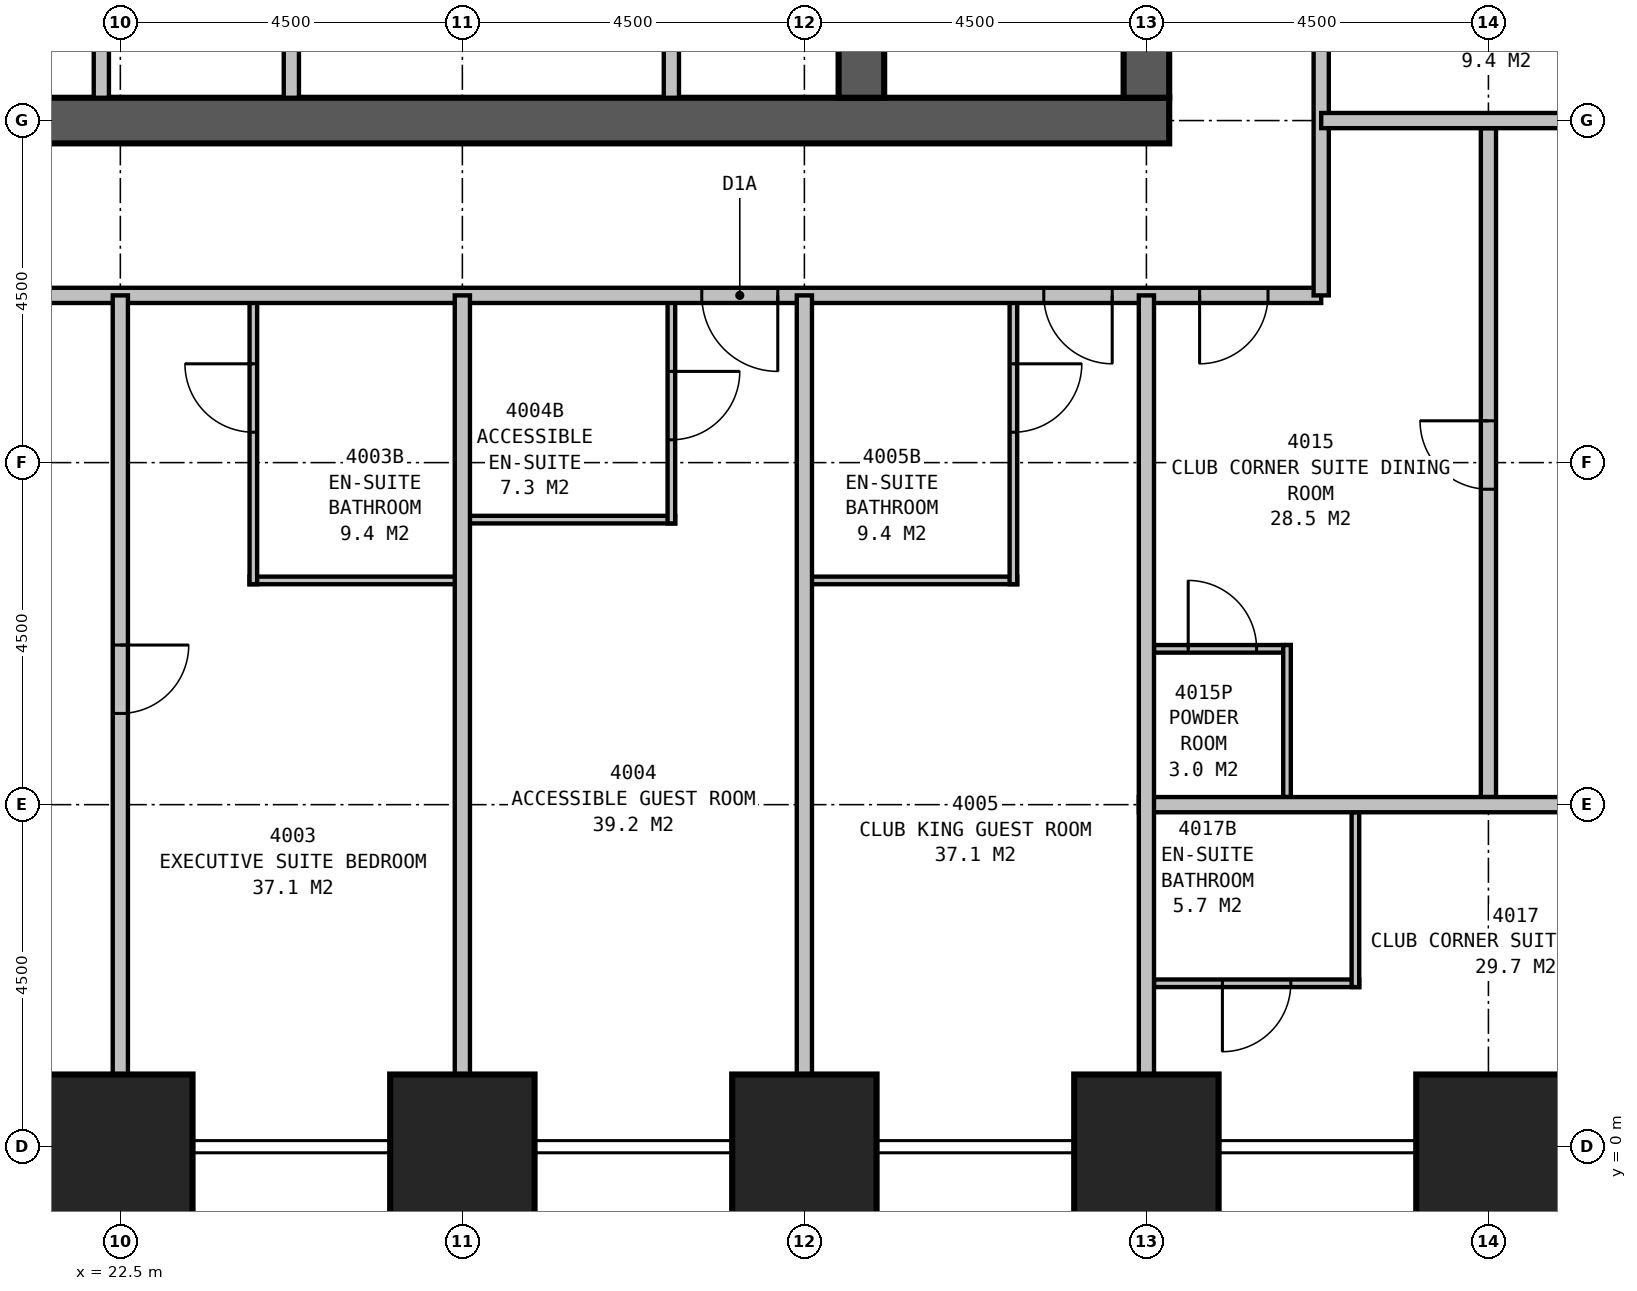
"""IFC4 building model, lengths in metres.
Left out: names, types, materials, properties, quantities, classifications, styles, units other than length and angle.
Written with IfcOpenShell. Run it as: python <this file> out.ifc"""

import sys

from ifc_helpers import new_model, si_unit, direction, frame, frame_2d, origin, origin_2d, place, context, subcontext, project, spatial, rectangle, extrude, element, fill, save


model = new_model("IFC4")
c1 = context("Model", 3, precision=1e-05, world=origin(), true_north=direction((0.0, 1.0)))
c2 = subcontext(c1, "Body", "Model", "MODEL_VIEW")
j1 = project(units=[si_unit("LENGTHUNIT", "METRE"), si_unit("PLANEANGLEUNIT", "RADIAN")], contexts=[c1])
p1 = place(None, origin())
s1 = spatial("IfcSite", under=j1, at=p1, CompositionType="ELEMENT")
p2 = place(p1, origin())
s2 = spatial("IfcBuilding", under=s1, at=p2, CompositionType="ELEMENT")
p3 = place(p2, frame((0.0, 0.0, 157.9)))
s3 = spatial("IfcBuildingStorey", under=s2, at=p3, CompositionType="ELEMENT", Elevation=157.9)
for number, where, z_axis, x_axis in (
    (1, (22.5, 0.0, 0.0), (0.0, 0.0, 1.0), (1.0, 0.0, 0.0)),
    (2, (27.0, 0.0, 0.0), (0.0, 0.0, 1.0), (1.0, 0.0, 0.0)),
    (3, (31.5, 0.0, 0.0), (0.0, 0.0, 1.0), (1.0, 0.0, 0.0)),
    (4, (36.0, 0.0, 0.0), (0.0, 0.0, 1.0), (1.0, 0.0, 0.0)),
    (5, (40.5, 0.0, 0.0), (0.0, 0.0, 1.0), (1.0, 0.0, 0.0)),
):
    element("IfcColumn", number, at=place(p3, frame(where, z_axis=z_axis, x_axis=x_axis)), inside=s3, PredefinedType="COLUMN", context=c2, shape_type="SweptSolid", body=[
        extrude(rectangle(XDim=1.9, YDim=1.9, at=origin_2d()), origin(), (0.0, 0.0, 1.0), 4.5),
    ])
p4 = place(p3, frame((13.2, 13.5, 0.0), z_axis=(0.0, 0.0, 1.0), x_axis=(1.0, 0.0, 0.0)))
e6 = element("IfcWall", 6, at=p4, inside=s3, PredefinedType="SHEAR", context=c2, shape_type="SweptSolid", body=[
    extrude(rectangle(XDim=23.1, YDim=0.6, at=frame_2d((11.55, 0.0))), origin(), (0.0, 0.0, 1.0), 4.5),
])
p5 = place(p3, frame((32.25, 13.8, 0.0), z_axis=(0.0, 0.0, 1.0), x_axis=(0.0, 1.0, 0.0)))
e7 = element("IfcWall", 7, at=p5, inside=s3, PredefinedType="SHEAR", context=c2, shape_type="SweptSolid", body=[
    extrude(rectangle(XDim=12.9, YDim=0.6, at=frame_2d((6.45, 0.0))), origin(), (0.0, 0.0, 1.0), 4.5),
])
p6 = place(p5, frame((5.05, 0.0, 0.0), z_axis=(0.0, 0.0, 1.0), x_axis=(-1.0, 0.0, 0.0)))
e8 = element("IfcOpeningElement", 8, at=p6, cuts=e7, PredefinedType="OPENING", context=c2, shape_type="SweptSolid", body=[
    extrude(rectangle(XDim=1.2, YDim=2.1, at=frame_2d((0.6, 1.05))), frame((0.0, 0.31, 0.0), z_axis=(0.0, -1.0, 0.0), x_axis=(1.0, 0.0, 0.0)), (0.0, 0.0, 1.0), 0.62),
])
p7 = place(p3, frame((36.0, 13.8, 0.0), z_axis=(0.0, 0.0, 1.0), x_axis=(0.0, 1.0, 0.0)))
e9 = element("IfcWall", 9, at=p7, inside=s3, PredefinedType="SHEAR", context=c2, shape_type="SweptSolid", body=[
    extrude(rectangle(XDim=2.7, YDim=0.6, at=frame_2d((1.35, 0.0))), origin(), (0.0, 0.0, 1.0), 4.5),
])
p8 = place(p3, frame((11.2, 11.2, 0.0), z_axis=(0.0, 0.0, 1.0), x_axis=(1.0, 0.0, 0.0)))
e10 = element("IfcWall", 10, at=p8, inside=s3, PredefinedType="PARTITIONING", context=c2, shape_type="SweptSolid", body=[
    extrude(rectangle(XDim=27.1, YDim=0.2, at=frame_2d((13.55, 0.0))), origin(), (0.0, 0.0, 1.0), 4.25),
])
p9 = place(p8, frame((5.95, 0.0, 0.0), z_axis=(0.0, 0.0, 1.0), x_axis=(-1.0, 0.0, 0.0)))
e11 = element("IfcOpeningElement", 11, at=p9, cuts=e10, PredefinedType="OPENING", context=c2, shape_type="SweptSolid", body=[
    extrude(rectangle(XDim=0.9, YDim=2.1, at=frame_2d((0.45, 1.05))), frame((0.0, 0.11, 0.0), z_axis=(0.0, -1.0, 0.0), x_axis=(1.0, 0.0, 0.0)), (0.0, 0.0, 1.0), 0.22),
])
p10 = place(p8, frame((19.95, 0.0, 0.0), z_axis=(0.0, 0.0, 1.0), x_axis=(-1.0, 0.0, 0.0)))
e12 = element("IfcOpeningElement", 12, at=p10, cuts=e10, PredefinedType="OPENING", context=c2, shape_type="SweptSolid", body=[
    extrude(rectangle(XDim=1.0, YDim=2.1, at=frame_2d((0.5, 1.05))), frame((0.0, 0.11, 0.0), z_axis=(0.0, -1.0, 0.0), x_axis=(1.0, 0.0, 0.0)), (0.0, 0.0, 1.0), 0.22),
])
p11 = place(p8, frame((24.35, 0.0, 0.0), z_axis=(0.0, 0.0, 1.0), x_axis=(-1.0, 0.0, 0.0)))
e13 = element("IfcOpeningElement", 13, at=p11, cuts=e10, PredefinedType="OPENING", context=c2, shape_type="SweptSolid", body=[
    extrude(rectangle(XDim=0.9, YDim=2.1, at=frame_2d((0.45, 1.05))), frame((0.0, 0.11, 0.0), z_axis=(0.0, -1.0, 0.0), x_axis=(1.0, 0.0, 0.0)), (0.0, 0.0, 1.0), 0.22),
])
p12 = place(p8, frame((1.6, 0.0, 0.0), z_axis=(0.0, 0.0, 1.0), x_axis=(-1.0, 0.0, 0.0)))
e14 = element("IfcOpeningElement", 14, at=p12, cuts=e10, PredefinedType="OPENING", context=c2, shape_type="SweptSolid", body=[
    extrude(rectangle(XDim=0.9, YDim=2.1, at=frame_2d((0.45, 1.05))), frame((0.0, 0.11, 0.0), z_axis=(0.0, -1.0, 0.0), x_axis=(1.0, 0.0, 0.0)), (0.0, 0.0, 1.0), 0.22),
])
p13 = place(p8, frame((26.4, 0.0, 0.0), z_axis=(0.0, 0.0, 1.0), x_axis=(-1.0, 0.0, 0.0)))
e15 = element("IfcOpeningElement", 15, at=p13, cuts=e10, PredefinedType="OPENING", context=c2, shape_type="SweptSolid", body=[
    extrude(rectangle(XDim=0.9, YDim=2.1, at=frame_2d((0.45, 1.05))), frame((0.0, 0.11, 0.0), z_axis=(0.0, -1.0, 0.0), x_axis=(1.0, 0.0, 0.0)), (0.0, 0.0, 1.0), 0.22),
])
p14 = place(p3, frame((38.3, 11.2, 0.0), z_axis=(0.0, 0.0, 1.0), x_axis=(0.0, 1.0, 0.0)))
e16 = element("IfcWall", 16, at=p14, inside=s3, PredefinedType="PARTITIONING", context=c2, shape_type="SweptSolid", body=[
    extrude(rectangle(XDim=18.7, YDim=0.2, at=frame_2d((9.35, 0.0))), origin(), (0.0, 0.0, 1.0), 4.25),
])
p15 = place(p14, frame((6.35, 0.0, 0.0), z_axis=(0.0, 0.0, 1.0), x_axis=(-1.0, 0.0, 0.0)))
e17 = element("IfcOpeningElement", 17, at=p15, cuts=e16, PredefinedType="OPENING", context=c2, shape_type="SweptSolid", body=[
    extrude(rectangle(XDim=0.9, YDim=2.1, at=frame_2d((0.45, 1.05))), frame((0.0, 0.11, 0.0), z_axis=(0.0, -1.0, 0.0), x_axis=(1.0, 0.0, 0.0)), (0.0, 0.0, 1.0), 0.22),
])
p16 = place(p14, frame((10.45, 0.0, 0.0), z_axis=(0.0, 0.0, 1.0), x_axis=(-1.0, 0.0, 0.0)))
e18 = element("IfcOpeningElement", 18, at=p16, cuts=e16, PredefinedType="OPENING", context=c2, shape_type="SweptSolid", body=[
    extrude(rectangle(XDim=0.9, YDim=2.1, at=frame_2d((0.45, 1.05))), frame((0.0, 0.11, 0.0), z_axis=(0.0, -1.0, 0.0), x_axis=(1.0, 0.0, 0.0)), (0.0, 0.0, 1.0), 0.22),
])
p17 = place(p3, frame((22.5, 11.2, 0.0), z_axis=(0.0, 0.0, 1.0), x_axis=(0.0, -1.0, 0.0)))
e19 = element("IfcWall", 19, at=p17, inside=s3, PredefinedType="PARTITIONING", context=c2, shape_type="SweptSolid", body=[
    extrude(rectangle(XDim=11.2, YDim=0.2, at=frame_2d((5.6, 0.0))), origin(), (0.0, 0.0, 1.0), 3.25),
])
p18 = place(p17, frame((4.6, 0.0, 0.0)))
e20 = element("IfcOpeningElement", 20, at=p18, cuts=e19, PredefinedType="OPENING", context=c2, shape_type="SweptSolid", body=[
    extrude(rectangle(XDim=0.9, YDim=2.1, at=frame_2d((0.45, 1.05))), frame((0.0, 0.11, 0.0), z_axis=(0.0, -1.0, 0.0), x_axis=(1.0, 0.0, 0.0)), (0.0, 0.0, 1.0), 0.22),
])
for number, where, z_axis, x_axis in (
    (21, (27.0, 11.2, 0.0), (0.0, 0.0, 1.0), (0.0, -1.0, 0.0)),
    (22, (31.5, 11.2, 0.0), (0.0, 0.0, 1.0), (0.0, -1.0, 0.0)),
):
    element("IfcWall", number, at=place(p3, frame(where, z_axis=z_axis, x_axis=x_axis)), inside=s3, PredefinedType="PARTITIONING", context=c2, shape_type="SweptSolid", body=[
        extrude(rectangle(XDim=11.2, YDim=0.2, at=frame_2d((5.6, 0.0))), origin(), (0.0, 0.0, 1.0), 3.25),
    ])
p19 = place(p3, frame((24.2, 7.45, 0.0), z_axis=(0.0, 0.0, 1.0), x_axis=(1.0, 0.0, 0.0)))
e23 = element("IfcWall", 23, at=p19, inside=s3, PredefinedType="PLUMBINGWALL", context=c2, shape_type="SweptSolid", body=[
    extrude(rectangle(XDim=2.8, YDim=0.1, at=frame_2d((1.4, 0.0))), origin(), (0.0, 0.0, 1.0), 4.25),
])
p20 = place(p3, frame((24.25, 11.2, 0.0), z_axis=(0.0, 0.0, 1.0), x_axis=(0.0, -1.0, 0.0)))
e24 = element("IfcWall", 24, at=p20, inside=s3, PredefinedType="PLUMBINGWALL", context=c2, shape_type="SweptSolid", body=[
    extrude(rectangle(XDim=3.8, YDim=0.1, at=frame_2d((1.9, 0.0))), origin(), (0.0, 0.0, 1.0), 4.25),
])
p21 = place(p20, frame((1.8, 0.0, 0.0), z_axis=(0.0, 0.0, 1.0), x_axis=(-1.0, 0.0, 0.0)))
e25 = element("IfcOpeningElement", 25, at=p21, cuts=e24, PredefinedType="OPENING", context=c2, shape_type="SweptSolid", body=[
    extrude(rectangle(XDim=0.9, YDim=2.1, at=frame_2d((0.45, 1.05))), frame((0.0, 0.06, 0.0), z_axis=(0.0, -1.0, 0.0), x_axis=(1.0, 0.0, 0.0)), (0.0, 0.0, 1.0), 0.12),
])
p22 = place(p3, frame((27.0, 8.25, 0.0), z_axis=(0.0, 0.0, 1.0), x_axis=(1.0, 0.0, 0.0)))
e26 = element("IfcWall", 26, at=p22, inside=s3, PredefinedType="PLUMBINGWALL", context=c2, shape_type="SweptSolid", body=[
    extrude(rectangle(XDim=2.8, YDim=0.1, at=frame_2d((1.4, 0.0))), origin(), (0.0, 0.0, 1.0), 4.25),
])
p23 = place(p3, frame((29.75, 11.2, 0.0), z_axis=(0.0, 0.0, 1.0), x_axis=(0.0, -1.0, 0.0)))
e27 = element("IfcWall", 27, at=p23, inside=s3, PredefinedType="PLUMBINGWALL", context=c2, shape_type="SweptSolid", body=[
    extrude(rectangle(XDim=3.0, YDim=0.1, at=frame_2d((1.5, 0.0))), origin(), (0.0, 0.0, 1.0), 4.25),
])
p24 = place(p23, frame((1.0, 0.0, 0.0)))
e28 = element("IfcOpeningElement", 28, at=p24, cuts=e27, PredefinedType="OPENING", context=c2, shape_type="SweptSolid", body=[
    extrude(rectangle(XDim=0.9, YDim=2.1, at=frame_2d((0.45, 1.05))), frame((0.0, 0.06, 0.0), z_axis=(0.0, -1.0, 0.0), x_axis=(1.0, 0.0, 0.0)), (0.0, 0.0, 1.0), 0.12),
])
p25 = place(p3, frame((31.5, 7.45, 0.0), z_axis=(0.0, 0.0, 1.0), x_axis=(1.0, 0.0, 0.0)))
e29 = element("IfcWall", 29, at=p25, inside=s3, PredefinedType="PLUMBINGWALL", context=c2, shape_type="SweptSolid", body=[
    extrude(rectangle(XDim=2.8, YDim=0.1, at=frame_2d((1.4, 0.0))), origin(), (0.0, 0.0, 1.0), 4.25),
])
p26 = place(p3, frame((34.25, 11.2, 0.0), z_axis=(0.0, 0.0, 1.0), x_axis=(0.0, -1.0, 0.0)))
e30 = element("IfcWall", 30, at=p26, inside=s3, PredefinedType="PLUMBINGWALL", context=c2, shape_type="SweptSolid", body=[
    extrude(rectangle(XDim=3.8, YDim=0.1, at=frame_2d((1.9, 0.0))), origin(), (0.0, 0.0, 1.0), 4.25),
])
p27 = place(p26, frame((0.9, 0.0, 0.0)))
e31 = element("IfcOpeningElement", 31, at=p27, cuts=e30, PredefinedType="OPENING", context=c2, shape_type="SweptSolid", body=[
    extrude(rectangle(XDim=0.9, YDim=2.1, at=frame_2d((0.45, 1.05))), frame((0.0, 0.06, 0.0), z_axis=(0.0, -1.0, 0.0), x_axis=(1.0, 0.0, 0.0)), (0.0, 0.0, 1.0), 0.12),
])
p28 = place(p3, frame((38.3, 13.5, 0.0), z_axis=(0.0, 0.0, 1.0), x_axis=(1.0, 0.0, 0.0)))
e32 = element("IfcWall", 32, at=p28, inside=s3, PredefinedType="PARTITIONING", context=c2, shape_type="SweptSolid", body=[
    extrude(rectangle(XDim=9.921, YDim=0.2, at=frame_2d((4.96, 0.0))), origin(), (0.0, 0.0, 1.0), 2.95),
])
p29 = place(p3, frame((36.0, 11.2, 0.0), z_axis=(0.0, 0.0, 1.0), x_axis=(0.0, -1.0, 0.0)))
e33 = element("IfcWall", 33, at=p29, inside=s3, PredefinedType="PARTITIONING", context=c2, shape_type="SweptSolid", body=[
    extrude(rectangle(XDim=11.2, YDim=0.2, at=frame_2d((5.6, 0.0))), origin(), (0.0, 0.0, 1.0), 3.25),
])
p30 = place(p3, frame((35.9, 4.5, 0.0), z_axis=(0.0, 0.0, 1.0), x_axis=(1.0, 0.0, 0.0)))
e34 = element("IfcWall", 34, at=p30, inside=s3, PredefinedType="PARTITIONING", context=c2, shape_type="SweptSolid", body=[
    extrude(rectangle(XDim=9.1, YDim=0.2, at=frame_2d((4.55, 0.0))), origin(), (0.0, 0.0, 1.0), 4.25),
])
p31 = place(p30, frame((7.1, 0.0, 0.0)))
e35 = element("IfcOpeningElement", 35, at=p31, cuts=e34, PredefinedType="OPENING", context=c2, shape_type="SweptSolid", body=[
    extrude(rectangle(XDim=0.9, YDim=2.1, at=frame_2d((0.45, 1.05))), frame((0.0, 0.11, 0.0), z_axis=(0.0, -1.0, 0.0), x_axis=(1.0, 0.0, 0.0)), (0.0, 0.0, 1.0), 0.22),
])
p32 = place(p3, frame((40.5, 4.6, 0.0), z_axis=(0.0, 0.0, 1.0), x_axis=(0.0, 1.0, 0.0)))
e36 = element("IfcWall", 36, at=p32, inside=s3, PredefinedType="PARTITIONING", context=c2, shape_type="SweptSolid", body=[
    extrude(rectangle(XDim=8.8, YDim=0.2, at=frame_2d((4.4, 0.0))), origin(), (0.0, 0.0, 1.0), 3.25),
])
p33 = place(p32, frame((4.05, 0.0, 0.0)))
e37 = element("IfcOpeningElement", 37, at=p33, cuts=e36, PredefinedType="OPENING", context=c2, shape_type="SweptSolid", body=[
    extrude(rectangle(XDim=0.9, YDim=2.1, at=frame_2d((0.45, 1.05))), frame((0.0, 0.11, 0.0), z_axis=(0.0, -1.0, 0.0), x_axis=(1.0, 0.0, 0.0)), (0.0, 0.0, 1.0), 0.22),
])
p34 = place(p3, frame((37.85, 4.6, 0.0), z_axis=(0.0, 0.0, 1.0), x_axis=(0.0, 1.0, 0.0)))
e38 = element("IfcWall", 38, at=p34, inside=s3, PredefinedType="PLUMBINGWALL", context=c2, shape_type="SweptSolid", body=[
    extrude(rectangle(XDim=2.0, YDim=0.1, at=frame_2d((1.0, 0.0))), origin(), (0.0, 0.0, 1.0), 4.25),
])
p35 = place(p3, frame((36.1, 6.55, 0.0), z_axis=(0.0, 0.0, 1.0), x_axis=(1.0, 0.0, 0.0)))
e39 = element("IfcWall", 39, at=p35, inside=s3, PredefinedType="PLUMBINGWALL", context=c2, shape_type="SweptSolid", body=[
    extrude(rectangle(XDim=1.8, YDim=0.1, at=frame_2d((0.9, 0.0))), origin(), (0.0, 0.0, 1.0), 4.25),
])
p36 = place(p35, frame((0.45, 0.0, 0.0)))
e40 = element("IfcOpeningElement", 40, at=p36, cuts=e39, PredefinedType="OPENING", context=c2, shape_type="SweptSolid", body=[
    extrude(rectangle(XDim=0.9, YDim=2.1, at=frame_2d((0.45, 1.05))), frame((0.0, 0.06, 0.0), z_axis=(0.0, -1.0, 0.0), x_axis=(1.0, 0.0, 0.0)), (0.0, 0.0, 1.0), 0.12),
])
p37 = place(p3, frame((38.75, 4.4, 0.0), z_axis=(0.0, 0.0, 1.0), x_axis=(0.0, -1.0, 0.0)))
e41 = element("IfcWall", 41, at=p37, inside=s3, PredefinedType="PLUMBINGWALL", context=c2, shape_type="SweptSolid", body=[
    extrude(rectangle(XDim=2.3, YDim=0.1, at=frame_2d((1.15, 0.0))), origin(), (0.0, 0.0, 1.0), 4.25),
])
p38 = place(p3, frame((36.1, 2.15, 0.0), z_axis=(0.0, 0.0, 1.0), x_axis=(1.0, 0.0, 0.0)))
e42 = element("IfcWall", 42, at=p38, inside=s3, PredefinedType="PLUMBINGWALL", context=c2, shape_type="SweptSolid", body=[
    extrude(rectangle(XDim=2.7, YDim=0.1, at=frame_2d((1.35, 0.0))), origin(), (0.0, 0.0, 1.0), 4.25),
])
p39 = place(p38, frame((1.8, 0.0, 0.0), z_axis=(0.0, 0.0, 1.0), x_axis=(-1.0, 0.0, 0.0)))
e43 = element("IfcOpeningElement", 43, at=p39, cuts=e42, PredefinedType="OPENING", context=c2, shape_type="SweptSolid", body=[
    extrude(rectangle(XDim=0.9, YDim=2.1, at=frame_2d((0.45, 1.05))), frame((0.0, 0.06, 0.0), z_axis=(0.0, -1.0, 0.0), x_axis=(1.0, 0.0, 0.0)), (0.0, 0.0, 1.0), 0.12),
])
for number, where, z_axis, x_axis in (
    (44, (22.25, 13.8, 0.0), (0.0, 0.0, 1.0), (0.0, 1.0, 0.0)),
    (45, (24.75, 13.8, 0.0), (0.0, 0.0, 1.0), (0.0, 1.0, 0.0)),
    (46, (29.75, 13.8, 0.0), (0.0, 0.0, 1.0), (0.0, 1.0, 0.0)),
):
    element("IfcWall", number, at=place(p3, frame(where, z_axis=z_axis, x_axis=x_axis)), inside=s3, PredefinedType="PARTITIONING", context=c2, shape_type="SweptSolid", body=[
        extrude(rectangle(XDim=2.4, YDim=0.2, at=frame_2d((1.2, 0.0))), origin(), (0.0, 0.0, 1.0), 4.25),
    ])
p40 = place(p10, origin())
e47 = element("IfcDoor", 47, at=p40, inside=s3, OperationType="SINGLE_SWING_LEFT", PredefinedType="DOOR", context=c2, shape_type="SweptSolid", body=[
    extrude(rectangle(XDim=1.0, YDim=2.1, at=frame_2d((0.5, 1.05))), frame((0.0, 0.025, 0.0), z_axis=(0.0, -1.0, 0.0), x_axis=(1.0, 0.0, 0.0)), (0.0, 0.0, 1.0), 0.05),
])
fill(e12, e47)
p41 = place(p11, origin())
e48 = element("IfcDoor", 48, at=p41, inside=s3, OperationType="SINGLE_SWING_LEFT", PredefinedType="DOOR", context=c2, shape_type="SweptSolid", body=[
    extrude(rectangle(XDim=0.9, YDim=2.1, at=frame_2d((0.45, 1.05))), frame((0.0, 0.025, 0.0), z_axis=(0.0, -1.0, 0.0), x_axis=(1.0, 0.0, 0.0)), (0.0, 0.0, 1.0), 0.05),
])
fill(e13, e48)
p42 = place(p13, origin())
e49 = element("IfcDoor", 49, at=p42, inside=s3, OperationType="SINGLE_SWING_RIGHT", PredefinedType="DOOR", context=c2, shape_type="SweptSolid", body=[
    extrude(rectangle(XDim=0.9, YDim=2.1, at=frame_2d((0.45, 1.05))), frame((0.0, 0.025, 0.0), z_axis=(0.0, -1.0, 0.0), x_axis=(1.0, 0.0, 0.0)), (0.0, 0.0, 1.0), 0.05),
])
fill(e15, e49)
p43 = place(p18, origin())
e50 = element("IfcDoor", 50, at=p43, inside=s3, OperationType="SINGLE_SWING_LEFT", PredefinedType="DOOR", context=c2, shape_type="SweptSolid", body=[
    extrude(rectangle(XDim=0.9, YDim=2.1, at=frame_2d((0.45, 1.05))), frame((0.0, 0.025, 0.0), z_axis=(0.0, -1.0, 0.0), x_axis=(1.0, 0.0, 0.0)), (0.0, 0.0, 1.0), 0.05),
])
fill(e20, e50)
p44 = place(p21, origin())
e51 = element("IfcDoor", 51, at=p44, inside=s3, OperationType="SINGLE_SWING_RIGHT", PredefinedType="DOOR", context=c2, shape_type="SweptSolid", body=[
    extrude(rectangle(XDim=0.9, YDim=2.1, at=frame_2d((0.45, 1.05))), frame((0.0, 0.025, 0.0), z_axis=(0.0, -1.0, 0.0), x_axis=(1.0, 0.0, 0.0)), (0.0, 0.0, 1.0), 0.05),
])
fill(e25, e51)
p45 = place(p24, origin())
e52 = element("IfcDoor", 52, at=p45, inside=s3, OperationType="SINGLE_SWING_LEFT", PredefinedType="DOOR", context=c2, shape_type="SweptSolid", body=[
    extrude(rectangle(XDim=0.9, YDim=2.1, at=frame_2d((0.45, 1.05))), frame((0.0, 0.025, 0.0), z_axis=(0.0, -1.0, 0.0), x_axis=(1.0, 0.0, 0.0)), (0.0, 0.0, 1.0), 0.05),
])
fill(e28, e52)
p46 = place(p27, origin())
e53 = element("IfcDoor", 53, at=p46, inside=s3, OperationType="SINGLE_SWING_LEFT", PredefinedType="DOOR", context=c2, shape_type="SweptSolid", body=[
    extrude(rectangle(XDim=0.9, YDim=2.1, at=frame_2d((0.45, 1.05))), frame((0.0, 0.025, 0.0), z_axis=(0.0, -1.0, 0.0), x_axis=(1.0, 0.0, 0.0)), (0.0, 0.0, 1.0), 0.05),
])
fill(e31, e53)
p47 = place(p33, origin())
e54 = element("IfcDoor", 54, at=p47, inside=s3, OperationType="SINGLE_SWING_RIGHT", PredefinedType="DOOR", context=c2, shape_type="SweptSolid", body=[
    extrude(rectangle(XDim=0.9, YDim=2.1, at=frame_2d((0.45, 1.05))), frame((0.0, 0.025, 0.0), z_axis=(0.0, -1.0, 0.0), x_axis=(1.0, 0.0, 0.0)), (0.0, 0.0, 1.0), 0.05),
])
fill(e37, e54)
p48 = place(p36, origin())
e55 = element("IfcDoor", 55, at=p48, inside=s3, OperationType="SINGLE_SWING_LEFT", PredefinedType="DOOR", context=c2, shape_type="SweptSolid", body=[
    extrude(rectangle(XDim=0.9, YDim=2.1, at=frame_2d((0.45, 1.05))), frame((0.0, 0.025, 0.0), z_axis=(0.0, -1.0, 0.0), x_axis=(1.0, 0.0, 0.0)), (0.0, 0.0, 1.0), 0.05),
])
fill(e40, e55)
p49 = place(p39, origin())
e56 = element("IfcDoor", 56, at=p49, inside=s3, OperationType="SINGLE_SWING_RIGHT", PredefinedType="DOOR", context=c2, shape_type="SweptSolid", body=[
    extrude(rectangle(XDim=0.9, YDim=2.1, at=frame_2d((0.45, 1.05))), frame((0.0, 0.025, 0.0), z_axis=(0.0, -1.0, 0.0), x_axis=(1.0, 0.0, 0.0)), (0.0, 0.0, 1.0), 0.05),
])
fill(e43, e56)
save(model, sys.argv[1])
